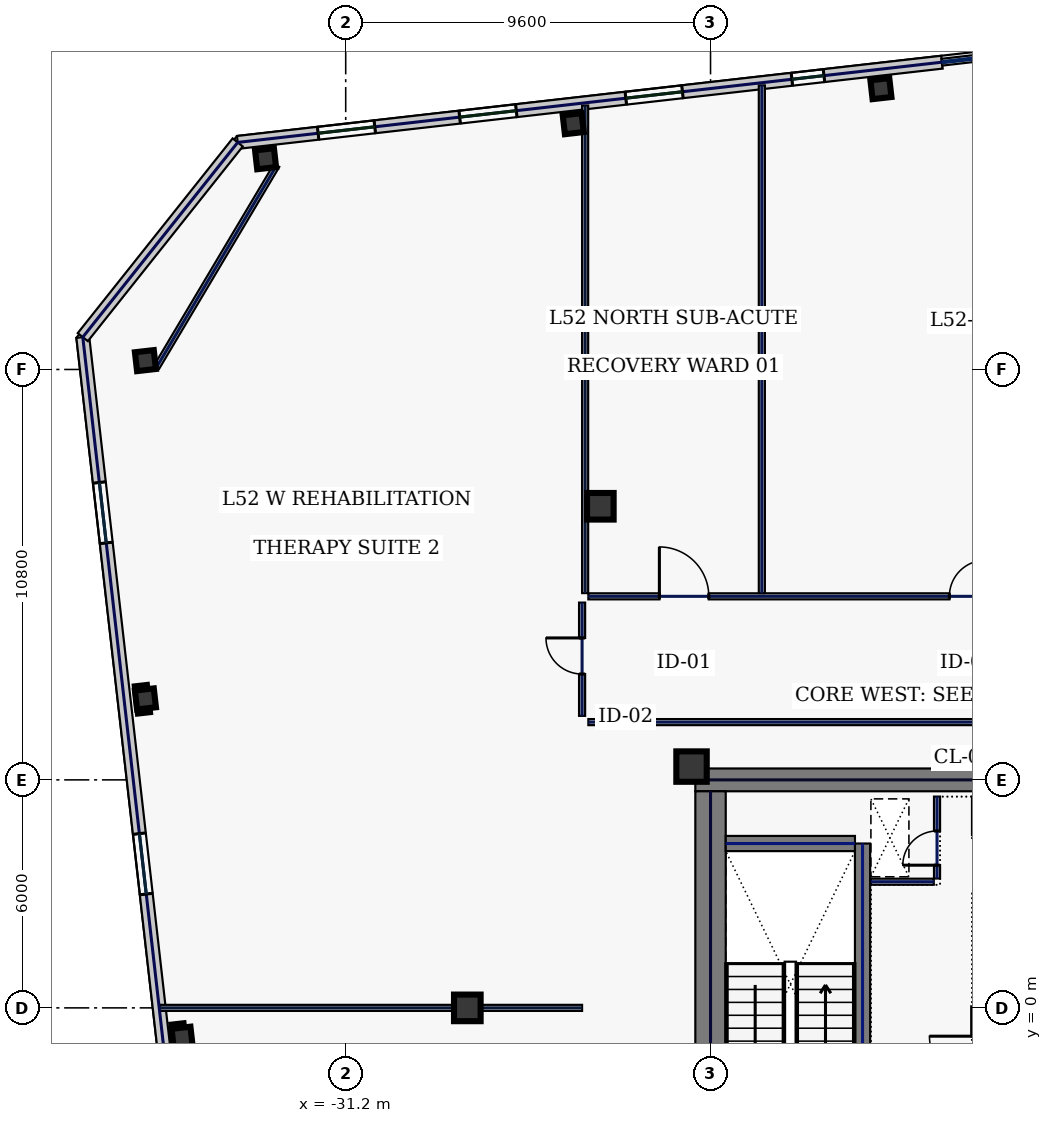
"""IFC4 building model, lengths in metres.
Left out: names, types, materials, properties, quantities, classifications, styles, units other than length and angle.
Written with IfcOpenShell. Run it as: python <this file> out.ifc"""

import sys

from ifc_helpers import new_model, si_unit, direction, frame, frame_2d, origin, origin_2d, place, context, subcontext, project, spatial, rectangle, hollow_rectangle, extrude, element, fill, save


model = new_model("IFC4")
c1 = context("Model", 3, precision=1e-05, world=origin(), true_north=direction((0.0, 1.0)))
c2 = subcontext(c1, "Body", "Model", "MODEL_VIEW")
j1 = project(units=[si_unit("LENGTHUNIT", "METRE"), si_unit("PLANEANGLEUNIT", "RADIAN")], contexts=[c1])
p1 = place(None, origin())
s1 = spatial("IfcSite", under=j1, at=p1, CompositionType="ELEMENT")
p2 = place(p1, origin())
s2 = spatial("IfcBuilding", under=s1, at=p2, CompositionType="ELEMENT")
p3 = place(p2, frame((0.0, 0.0, 226.2)))
s3 = spatial("IfcBuildingStorey", under=s2, at=p3, CompositionType="ELEMENT", Elevation=226.2)
p4 = place(p3, frame((-22.0, 6.0, 0.0), z_axis=(0.0, 0.0, 1.0), x_axis=(1.0, 0.0, 0.0)))
e1 = element("IfcWall", 1, at=p4, inside=s3, PredefinedType="SHEAR", context=c2, shape_type="SweptSolid", body=[
    extrude(rectangle(XDim=11.5, YDim=0.6, at=frame_2d((5.75, 0.0))), origin(), (0.0, 0.0, 1.0), 3.74),
])
p5 = place(p3, frame((-21.6, -5.7, 0.0), z_axis=(0.0, 0.0, 1.0), x_axis=(0.0, 1.0, 0.0)))
e2 = element("IfcWall", 2, at=p5, inside=s3, PredefinedType="SHEAR", context=c2, shape_type="SweptSolid", body=[
    extrude(rectangle(XDim=11.4, YDim=0.8, at=frame_2d((5.7, 0.0))), origin(), (0.0, 0.0, 1.0), 3.74),
])
p6 = place(p3, frame((-17.6, -4.325, 0.0), z_axis=(0.0, 0.0, 1.0), x_axis=(0.0, 1.0, 0.0)))
e3 = element("IfcWall", 3, at=p6, inside=s3, PredefinedType="SHEAR", context=c2, shape_type="SweptSolid", body=[
    extrude(rectangle(XDim=8.65, YDim=0.4, at=frame_2d((4.325, 0.0))), origin(), (0.0, 0.0, 1.0), 3.74),
])
p7 = place(p6, frame((0.25, 0.0, 0.0)))
e4 = element("IfcOpeningElement", 4, at=p7, cuts=e3, PredefinedType="OPENING", context=c2, shape_type="SweptSolid", body=[
    extrude(rectangle(XDim=1.1, YDim=2.2, at=frame_2d((0.55, 1.1))), frame((0.0, 0.21, 0.0), z_axis=(0.0, -1.0, 0.0), x_axis=(1.0, 0.0, 0.0)), (0.0, 0.0, 1.0), 0.42),
])
p8 = place(p3, frame((-21.2, 4.325, 0.0), z_axis=(0.0, 0.0, 1.0), x_axis=(1.0, 0.0, 0.0)))
e5 = element("IfcWall", 5, at=p8, inside=s3, PredefinedType="SHEAR", context=c2, shape_type="SweptSolid", body=[
    extrude(rectangle(XDim=3.4, YDim=0.4, at=frame_2d((1.7, 0.0))), origin(), (0.0, 0.0, 1.0), 3.74),
])
p9 = place(p3, frame((-22.1, 6.35, 0.0), z_axis=(0.0, 0.0, 1.0), x_axis=(1.0, 0.0, 0.0)))
e6 = element("IfcColumn", 6, at=p9, inside=s3, PredefinedType="COLUMN", context=c2, shape_type="SweptSolid", body=[
    extrude(hollow_rectangle(XDim=0.8, YDim=0.8, WallThickness=0.036, at=origin_2d()), origin(), (0.0, 0.0, 1.0), 3.74),
])
for number, where, z_axis, x_axis in (
    (7, (-24.5, 13.2, 0.0), (0.0, 0.0, 1.0), (1.0, 0.0, 0.0)),
    (8, (-28.0, 0.0, 0.0), (0.0, 0.0, 1.0), (1.0, 0.0, 0.0)),
):
    element("IfcColumn", number, at=place(p3, frame(where, z_axis=z_axis, x_axis=x_axis)), inside=s3, PredefinedType="COLUMN", context=c2, shape_type="SweptSolid", body=[
        extrude(hollow_rectangle(XDim=0.7, YDim=0.7, WallThickness=0.032, at=origin_2d()), origin(), (0.0, 0.0, 1.0), 3.74),
    ])
for number, where, z_axis, x_axis in (
    (9, (-17.116, 24.19, 0.0), (0.0, 0.0, 1.0), (0.994, 0.113, 0.0)),
    (10, (-25.212, 23.268, 0.0), (0.0, 0.0, 1.0), (0.994, 0.113, 0.0)),
    (11, (-33.309, 22.345, 0.0), (0.0, 0.0, 1.0), (0.994, 0.113, 0.0)),
    (12, (-36.47, 17.033, 0.0), (0.0, 0.0, 1.0), (0.994, 0.113, 0.0)),
    (13, (-36.47, 8.131, 0.0), (0.0, 0.0, 1.0), (0.994, 0.113, 0.0)),
    (14, (-35.506, -0.772, 0.0), (0.0, 0.0, 1.0), (0.994, 0.113, 0.0)),
):
    element("IfcColumn", number, at=place(p3, frame(where, z_axis=z_axis, x_axis=x_axis)), inside=s3, PredefinedType="COLUMN", context=c2, shape_type="SweptSolid", body=[
        extrude(hollow_rectangle(XDim=0.5, YDim=0.5, WallThickness=0.025, at=origin_2d()), origin(), (0.0, 0.0, 1.0), 3.74),
    ])
p10 = place(p3, frame((-15.51, 24.886, 0.0), z_axis=(0.0, 0.0, 1.0), x_axis=(-0.993572271362, -0.113199565282, 0.0)))
e15 = element("IfcWall", 15, at=p10, inside=s3, PredefinedType="STANDARD", context=c2, shape_type="SweptSolid", body=[
    extrude(rectangle(XDim=18.651, YDim=0.34, at=frame_2d((9.326, 0.0))), origin(), (0.0, 0.0, 1.0), 3.74),
])
p11 = place(p10, frame((15.021, 0.0, 0.83)))
e16 = element("IfcOpeningElement", 16, at=p11, cuts=e15, PredefinedType="OPENING", context=c2, shape_type="SweptSolid", body=[
    extrude(rectangle(XDim=1.5, YDim=2.0, at=frame_2d((0.75, 1.0))), frame((0.0, 0.18, 0.0), z_axis=(0.0, -1.0, 0.0), x_axis=(1.0, 0.0, 0.0)), (0.0, 0.0, 1.0), 0.36),
])
p12 = place(p10, frame((11.273, 0.0, 0.83)))
e17 = element("IfcOpeningElement", 17, at=p12, cuts=e15, PredefinedType="OPENING", context=c2, shape_type="SweptSolid", body=[
    extrude(rectangle(XDim=1.5, YDim=2.0, at=frame_2d((0.75, 1.0))), frame((0.0, 0.18, 0.0), z_axis=(0.0, -1.0, 0.0), x_axis=(1.0, 0.0, 0.0)), (0.0, 0.0, 1.0), 0.36),
])
p13 = place(p10, frame((6.873, 0.0, 0.83)))
e18 = element("IfcOpeningElement", 18, at=p13, cuts=e15, PredefinedType="OPENING", context=c2, shape_type="SweptSolid", body=[
    extrude(rectangle(XDim=1.5, YDim=2.0, at=frame_2d((0.75, 1.0))), frame((0.0, 0.18, 0.0), z_axis=(0.0, -1.0, 0.0), x_axis=(1.0, 0.0, 0.0)), (0.0, 0.0, 1.0), 0.36),
])
p14 = place(p10, frame((3.125, 0.0, 0.83)))
e19 = element("IfcOpeningElement", 19, at=p14, cuts=e15, PredefinedType="OPENING", context=c2, shape_type="SweptSolid", body=[
    extrude(rectangle(XDim=0.85, YDim=1.85, at=frame_2d((0.425, 0.925))), frame((0.0, 0.18, 0.0), z_axis=(0.0, -1.0, 0.0), x_axis=(1.0, 0.0, 0.0)), (0.0, 0.0, 1.0), 0.36),
])
p15 = place(p3, frame((-38.118, 17.651, 0.0), z_axis=(0.0, 0.0, 1.0), x_axis=(0.11320360501, -0.9935718111, 0.0)))
e20 = element("IfcWall", 20, at=p15, inside=s3, PredefinedType="STANDARD", context=c2, shape_type="SweptSolid", body=[
    extrude(rectangle(XDim=37.2, YDim=0.34, at=frame_2d((18.6, 0.0))), origin(), (0.0, 0.0, 1.0), 3.74),
])
p16 = place(p15, frame((3.85, 0.0, 0.58)))
e21 = element("IfcOpeningElement", 21, at=p16, cuts=e20, PredefinedType="OPENING", context=c2, shape_type="SweptSolid", body=[
    extrude(rectangle(XDim=1.6, YDim=2.3, at=frame_2d((0.8, 1.15))), frame((0.0, 0.18, 0.0), z_axis=(0.0, -1.0, 0.0), x_axis=(1.0, 0.0, 0.0)), (0.0, 0.0, 1.0), 0.36),
])
p17 = place(p15, frame((13.15, 0.0, 0.58)))
e22 = element("IfcOpeningElement", 22, at=p17, cuts=e20, PredefinedType="OPENING", context=c2, shape_type="SweptSolid", body=[
    extrude(rectangle(XDim=1.6, YDim=2.3, at=frame_2d((0.8, 1.15))), frame((0.0, 0.18, 0.0), z_axis=(0.0, -1.0, 0.0), x_axis=(1.0, 0.0, 0.0)), (0.0, 0.0, 1.0), 0.36),
])
p18 = place(p15, frame((22.45, 0.0, 0.58)))
e23 = element("IfcOpeningElement", 23, at=p18, cuts=e20, PredefinedType="OPENING", context=c2, shape_type="SweptSolid", body=[
    extrude(rectangle(XDim=1.6, YDim=2.3, at=frame_2d((0.8, 1.15))), frame((0.0, 0.18, 0.0), z_axis=(0.0, -1.0, 0.0), x_axis=(1.0, 0.0, 0.0)), (0.0, 0.0, 1.0), 0.36),
])
p19 = place(p15, frame((31.75, 0.0, 0.58)))
e24 = element("IfcOpeningElement", 24, at=p19, cuts=e20, PredefinedType="OPENING", context=c2, shape_type="SweptSolid", body=[
    extrude(rectangle(XDim=1.6, YDim=2.3, at=frame_2d((0.8, 1.15))), frame((0.0, 0.18, 0.0), z_axis=(0.0, -1.0, 0.0), x_axis=(1.0, 0.0, 0.0)), (0.0, 0.0, 1.0), 0.36),
])
p20 = place(p3, frame((-34.042, 22.775, 0.0), z_axis=(0.0, 0.0, 1.0), x_axis=(-0.62252823689, -0.78259733853, 0.0)))
e25 = element("IfcWall", 25, at=p20, inside=s3, PredefinedType="STANDARD", context=c2, shape_type="SweptSolid", body=[
    extrude(rectangle(XDim=6.548, YDim=0.34, at=frame_2d((3.274, 0.0))), origin(), (0.0, 0.0, 1.0), 3.74),
])
p21 = place(p3, frame((-15.64, 3.405, 0.0), z_axis=(0.0, 0.0, 1.0), x_axis=(0.0, 1.0, 0.0)))
e26 = element("IfcWall", 26, at=p21, inside=s3, PredefinedType="PARTITIONING", context=c2, shape_type="SweptSolid", body=[
    extrude(rectangle(XDim=2.155, YDim=0.16, at=frame_2d((1.078, 0.0))), origin(), (0.0, 0.0, 1.0), 3.74),
])
p22 = place(p21, frame((0.35, 0.0, 0.0)))
e27 = element("IfcOpeningElement", 27, at=p22, cuts=e26, PredefinedType="OPENING", context=c2, shape_type="SweptSolid", body=[
    extrude(rectangle(XDim=0.9, YDim=2.2, at=frame_2d((0.45, 1.1))), frame((0.0, 0.09, 0.0), z_axis=(0.0, -1.0, 0.0), x_axis=(1.0, 0.0, 0.0)), (0.0, 0.0, 1.0), 0.18),
])
p23 = place(p3, frame((-17.38, 3.32, 0.0), z_axis=(0.0, 0.0, 1.0), x_axis=(1.0, 0.0, 0.0)))
e28 = element("IfcWall", 28, at=p23, inside=s3, PredefinedType="PARTITIONING", context=c2, shape_type="SweptSolid", body=[
    extrude(rectangle(XDim=1.655, YDim=0.16, at=frame_2d((0.827, 0.0))), origin(), (0.0, 0.0, 1.0), 3.74),
])
p24 = place(p3, frame((-14.64, -4.035, 0.0), z_axis=(0.0, 0.0, 1.0), x_axis=(0.0, 1.0, 0.0)))
e29 = element("IfcWall", 29, at=p24, inside=s3, PredefinedType="SOLIDWALL", context=c2, shape_type="SweptSolid", body=[
    extrude(rectangle(XDim=4.075, YDim=0.2, at=frame_2d((2.038, 0.0))), origin(), (0.0, 0.0, 1.0), 3.74),
])
p25 = place(p24, frame((2.09, 0.0, 0.0)))
e30 = element("IfcOpeningElement", 30, at=p25, cuts=e29, PredefinedType="OPENING", context=c2, shape_type="SweptSolid", body=[
    extrude(rectangle(XDim=1.2, YDim=2.2, at=frame_2d((0.6, 1.1))), frame((0.0, 0.11, 0.0), z_axis=(0.0, -1.0, 0.0), x_axis=(1.0, 0.0, 0.0)), (0.0, 0.0, 1.0), 0.22),
])
p26 = place(p3, frame((-33.016, 22.171, 0.0), z_axis=(0.0, 0.0, 1.0), x_axis=(-0.511385266265, -0.859351563359, 0.0)))
e31 = element("IfcWall", 31, at=p26, inside=s3, PredefinedType="PARTITIONING", context=c2, shape_type="SweptSolid", body=[
    extrude(rectangle(XDim=6.182, YDim=0.16, at=frame_2d((3.091, 0.0))), origin(), (0.0, 0.0, 1.0), 3.74),
])
p27 = place(p3, frame((-10.715, 7.52, 0.0), z_axis=(0.0, 0.0, 1.0), x_axis=(-1.0, 0.0, 0.0)))
e32 = element("IfcWall", 32, at=p27, inside=s3, PredefinedType="PARTITIONING", context=c2, shape_type="SweptSolid", body=[
    extrude(rectangle(XDim=14.1, YDim=0.16, at=frame_2d((7.05, 0.0))), origin(), (0.0, 0.0, 1.0), 3.74),
])
p28 = place(p3, frame((-24.98, 7.685, 0.0), z_axis=(0.0, 0.0, 1.0), x_axis=(0.0, 1.0, 0.0)))
e33 = element("IfcWall", 33, at=p28, inside=s3, PredefinedType="PARTITIONING", context=c2, shape_type="SweptSolid", body=[
    extrude(rectangle(XDim=2.98, YDim=0.16, at=frame_2d((1.49, 0.0))), origin(), (0.0, 0.0, 1.0), 3.74),
])
p29 = place(p28, frame((1.1, 0.0, 0.0)))
e34 = element("IfcOpeningElement", 34, at=p29, cuts=e33, PredefinedType="OPENING", context=c2, shape_type="SweptSolid", body=[
    extrude(rectangle(XDim=0.95, YDim=2.2, at=frame_2d((0.475, 1.1))), frame((0.0, 0.09, 0.0), z_axis=(0.0, -1.0, 0.0), x_axis=(1.0, 0.0, 0.0)), (0.0, 0.0, 1.0), 0.18),
])
p30 = place(p3, frame((-24.815, 10.83, 0.0), z_axis=(0.0, 0.0, 1.0), x_axis=(1.0, 0.0, 0.0)))
e35 = element("IfcWall", 35, at=p30, inside=s3, PredefinedType="PARTITIONING", context=c2, shape_type="SweptSolid", body=[
    extrude(rectangle(XDim=49.63, YDim=0.16, at=frame_2d((24.815, 0.0))), origin(), (0.0, 0.0, 1.0), 3.74),
])
p31 = place(p30, frame((1.869, 0.0, 0.0)))
e36 = element("IfcOpeningElement", 36, at=p31, cuts=e35, PredefinedType="OPENING", context=c2, shape_type="SweptSolid", body=[
    extrude(rectangle(XDim=1.3, YDim=2.2, at=frame_2d((0.65, 1.1))), frame((0.0, 0.09, 0.0), z_axis=(0.0, -1.0, 0.0), x_axis=(1.0, 0.0, 0.0)), (0.0, 0.0, 1.0), 0.18),
])
p32 = place(p30, frame((9.5, 0.0, 0.0)))
e37 = element("IfcOpeningElement", 37, at=p32, cuts=e35, PredefinedType="OPENING", context=c2, shape_type="SweptSolid", body=[
    extrude(rectangle(XDim=0.95, YDim=2.2, at=frame_2d((0.475, 1.1))), frame((0.0, 0.09, 0.0), z_axis=(0.0, -1.0, 0.0), x_axis=(1.0, 0.0, 0.0)), (0.0, 0.0, 1.0), 0.18),
])
p33 = place(p30, frame((17.425, 0.0, 0.0)))
e38 = element("IfcOpeningElement", 38, at=p33, cuts=e35, PredefinedType="OPENING", context=c2, shape_type="SweptSolid", body=[
    extrude(rectangle(XDim=1.3, YDim=2.2, at=frame_2d((0.65, 1.1))), frame((0.0, 0.09, 0.0), z_axis=(0.0, -1.0, 0.0), x_axis=(1.0, 0.0, 0.0)), (0.0, 0.0, 1.0), 0.18),
])
p34 = place(p30, frame((22.525, 0.0, 0.0)))
e39 = element("IfcOpeningElement", 39, at=p34, cuts=e35, PredefinedType="OPENING", context=c2, shape_type="SweptSolid", body=[
    extrude(rectangle(XDim=1.45, YDim=2.2, at=frame_2d((0.725, 1.1))), frame((0.0, 0.09, 0.0), z_axis=(0.0, -1.0, 0.0), x_axis=(1.0, 0.0, 0.0)), (0.0, 0.0, 1.0), 0.18),
])
p35 = place(p30, frame((27.8, 0.0, 0.0)))
e40 = element("IfcOpeningElement", 40, at=p35, cuts=e35, PredefinedType="OPENING", context=c2, shape_type="SweptSolid", body=[
    extrude(rectangle(XDim=0.95, YDim=2.2, at=frame_2d((0.475, 1.1))), frame((0.0, 0.09, 0.0), z_axis=(0.0, -1.0, 0.0), x_axis=(1.0, 0.0, 0.0)), (0.0, 0.0, 1.0), 0.18),
])
p36 = place(p30, frame((32.725, 0.0, 0.0)))
e41 = element("IfcOpeningElement", 41, at=p36, cuts=e35, PredefinedType="OPENING", context=c2, shape_type="SweptSolid", body=[
    extrude(rectangle(XDim=1.3, YDim=2.2, at=frame_2d((0.65, 1.1))), frame((0.0, 0.09, 0.0), z_axis=(0.0, -1.0, 0.0), x_axis=(1.0, 0.0, 0.0)), (0.0, 0.0, 1.0), 0.18),
])
p37 = place(p30, frame((37.92, 0.0, 0.0)))
e42 = element("IfcOpeningElement", 42, at=p37, cuts=e35, PredefinedType="OPENING", context=c2, shape_type="SweptSolid", body=[
    extrude(rectangle(XDim=0.95, YDim=2.2, at=frame_2d((0.475, 1.1))), frame((0.0, 0.09, 0.0), z_axis=(0.0, -1.0, 0.0), x_axis=(1.0, 0.0, 0.0)), (0.0, 0.0, 1.0), 0.18),
])
p38 = place(p30, frame((42.47, 0.0, 0.0)))
e43 = element("IfcOpeningElement", 43, at=p38, cuts=e35, PredefinedType="OPENING", context=c2, shape_type="SweptSolid", body=[
    extrude(rectangle(XDim=1.05, YDim=2.2, at=frame_2d((0.525, 1.1))), frame((0.0, 0.09, 0.0), z_axis=(0.0, -1.0, 0.0), x_axis=(1.0, 0.0, 0.0)), (0.0, 0.0, 1.0), 0.18),
])
p39 = place(p30, frame((46.631, 0.0, 0.0)))
e44 = element("IfcOpeningElement", 44, at=p39, cuts=e35, PredefinedType="OPENING", context=c2, shape_type="SweptSolid", body=[
    extrude(rectangle(XDim=0.95, YDim=2.2, at=frame_2d((0.475, 1.1))), frame((0.0, 0.09, 0.0), z_axis=(0.0, -1.0, 0.0), x_axis=(1.0, 0.0, 0.0)), (0.0, 0.0, 1.0), 0.18),
])
p40 = place(p3, frame((-24.9, 10.915, 0.0), z_axis=(0.0, 0.0, 1.0), x_axis=(0.0, 1.0, 0.0)))
e45 = element("IfcWall", 45, at=p40, inside=s3, PredefinedType="PARTITIONING", context=c2, shape_type="SweptSolid", body=[
    extrude(rectangle(XDim=12.831, YDim=0.16, at=frame_2d((6.416, 0.0))), origin(), (0.0, 0.0, 1.0), 2.135),
])
p41 = place(p3, frame((-20.25, 10.915, 0.0), z_axis=(0.0, 0.0, 1.0), x_axis=(0.0, 1.0, 0.0)))
e46 = element("IfcWall", 46, at=p41, inside=s3, PredefinedType="PARTITIONING", context=c2, shape_type="SweptSolid", body=[
    extrude(rectangle(XDim=13.361, YDim=0.16, at=frame_2d((6.681, 0.0))), origin(), (0.0, 0.0, 1.0), 3.74),
])
p42 = place(p3, frame((-36.087, 0.0, 0.0), z_axis=(0.0, 0.0, 1.0), x_axis=(1.0, 0.0, 0.0)))
e47 = element("IfcWall", 47, at=p42, inside=s3, PredefinedType="PARTITIONING", context=c2, shape_type="SweptSolid", body=[
    extrude(rectangle(XDim=11.107, YDim=0.16, at=frame_2d((5.553, 0.0))), origin(), (0.0, 0.0, 1.0), 2.135),
])
p43 = place(p11, origin())
e48 = element("IfcWindow", 48, at=p43, inside=s3, PartitioningType="SINGLE_PANEL", PredefinedType="WINDOW", context=c2, shape_type="SweptSolid", body=[
    extrude(rectangle(XDim=1.5, YDim=2.0, at=frame_2d((0.75, 1.0))), frame((0.0, 0.03, 0.0), z_axis=(0.0, -1.0, 0.0), x_axis=(1.0, 0.0, 0.0)), (0.0, 0.0, 1.0), 0.06),
])
fill(e16, e48)
p44 = place(p12, origin())
e49 = element("IfcWindow", 49, at=p44, inside=s3, PartitioningType="SINGLE_PANEL", PredefinedType="WINDOW", context=c2, shape_type="SweptSolid", body=[
    extrude(rectangle(XDim=1.5, YDim=2.0, at=frame_2d((0.75, 1.0))), frame((0.0, 0.03, 0.0), z_axis=(0.0, -1.0, 0.0), x_axis=(1.0, 0.0, 0.0)), (0.0, 0.0, 1.0), 0.06),
])
fill(e17, e49)
p45 = place(p13, origin())
e50 = element("IfcWindow", 50, at=p45, inside=s3, PartitioningType="SINGLE_PANEL", PredefinedType="WINDOW", context=c2, shape_type="SweptSolid", body=[
    extrude(rectangle(XDim=1.5, YDim=2.0, at=frame_2d((0.75, 1.0))), frame((0.0, 0.03, 0.0), z_axis=(0.0, -1.0, 0.0), x_axis=(1.0, 0.0, 0.0)), (0.0, 0.0, 1.0), 0.06),
])
fill(e18, e50)
p46 = place(p14, origin())
e51 = element("IfcWindow", 51, at=p46, inside=s3, PartitioningType="SINGLE_PANEL", PredefinedType="WINDOW", context=c2, shape_type="SweptSolid", body=[
    extrude(rectangle(XDim=0.85, YDim=1.85, at=frame_2d((0.425, 0.925))), frame((0.0, 0.03, 0.0), z_axis=(0.0, -1.0, 0.0), x_axis=(1.0, 0.0, 0.0)), (0.0, 0.0, 1.0), 0.06),
])
fill(e19, e51)
p47 = place(p16, origin())
e52 = element("IfcWindow", 52, at=p47, inside=s3, PartitioningType="SINGLE_PANEL", PredefinedType="WINDOW", context=c2, shape_type="SweptSolid", body=[
    extrude(rectangle(XDim=1.6, YDim=2.3, at=frame_2d((0.8, 1.15))), frame((0.0, 0.03, 0.0), z_axis=(0.0, -1.0, 0.0), x_axis=(1.0, 0.0, 0.0)), (0.0, 0.0, 1.0), 0.06),
])
fill(e21, e52)
p48 = place(p17, origin())
e53 = element("IfcWindow", 53, at=p48, inside=s3, PartitioningType="SINGLE_PANEL", PredefinedType="WINDOW", context=c2, shape_type="SweptSolid", body=[
    extrude(rectangle(XDim=1.6, YDim=2.3, at=frame_2d((0.8, 1.15))), frame((0.0, 0.03, 0.0), z_axis=(0.0, -1.0, 0.0), x_axis=(1.0, 0.0, 0.0)), (0.0, 0.0, 1.0), 0.06),
])
fill(e22, e53)
p49 = place(p22, origin())
e54 = element("IfcDoor", 54, at=p49, inside=s3, OperationType="SINGLE_SWING_LEFT", PredefinedType="DOOR", context=c2, shape_type="SweptSolid", body=[
    extrude(rectangle(XDim=0.9, YDim=2.2, at=frame_2d((0.45, 1.1))), frame((0.0, 0.025, 0.0), z_axis=(0.0, -1.0, 0.0), x_axis=(1.0, 0.0, 0.0)), (0.0, 0.0, 1.0), 0.05),
])
fill(e27, e54)
p50 = place(p31, origin())
e55 = element("IfcDoor", 55, at=p50, inside=s3, OperationType="SINGLE_SWING_LEFT", PredefinedType="DOOR", context=c2, shape_type="SweptSolid", body=[
    extrude(rectangle(XDim=1.3, YDim=2.2, at=frame_2d((0.65, 1.1))), frame((0.0, 0.025, 0.0), z_axis=(0.0, -1.0, 0.0), x_axis=(1.0, 0.0, 0.0)), (0.0, 0.0, 1.0), 0.05),
])
fill(e36, e55)
p51 = place(p32, origin())
e56 = element("IfcDoor", 56, at=p51, inside=s3, OperationType="SINGLE_SWING_RIGHT", PredefinedType="DOOR", context=c2, shape_type="SweptSolid", body=[
    extrude(rectangle(XDim=0.95, YDim=2.2, at=frame_2d((0.475, 1.1))), frame((0.0, 0.025, 0.0), z_axis=(0.0, -1.0, 0.0), x_axis=(1.0, 0.0, 0.0)), (0.0, 0.0, 1.0), 0.05),
])
fill(e37, e56)
p52 = place(p29, origin())
e57 = element("IfcDoor", 57, at=p52, inside=s3, OperationType="SINGLE_SWING_RIGHT", PredefinedType="DOOR", context=c2, shape_type="SweptSolid", body=[
    extrude(rectangle(XDim=0.95, YDim=2.2, at=frame_2d((0.475, 1.1))), frame((0.0, 0.025, 0.0), z_axis=(0.0, -1.0, 0.0), x_axis=(1.0, 0.0, 0.0)), (0.0, 0.0, 1.0), 0.05),
])
fill(e34, e57)
save(model, sys.argv[1])
